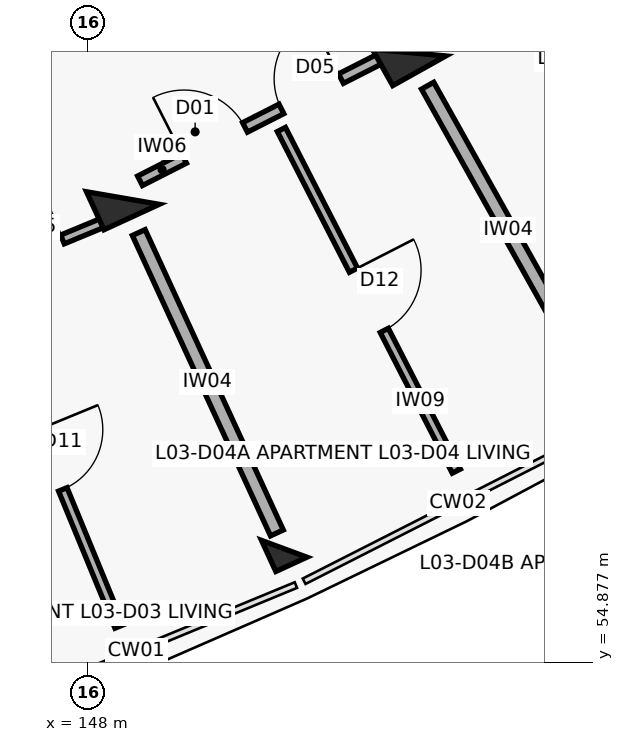
"""IFC4 building model, lengths in metres.
Left out: names, types, materials, properties, quantities, classifications, styles, units other than length and angle.
Written with IfcOpenShell. Run it as: python <this file> out.ifc"""

import sys

from ifc_helpers import new_model, si_unit, direction, frame, frame_2d, origin, origin_2d, place, context, subcontext, project, spatial, rectangle, extrude, element, fill, save


model = new_model("IFC4")
c1 = context("Model", 3, precision=1e-05, world=origin(), true_north=direction((0.0, 1.0)))
c2 = subcontext(c1, "Body", "Model", "MODEL_VIEW")
j1 = project(units=[si_unit("LENGTHUNIT", "METRE"), si_unit("PLANEANGLEUNIT", "RADIAN")], contexts=[c1])
p1 = place(None, origin())
s1 = spatial("IfcSite", under=j1, at=p1, CompositionType="ELEMENT")
p2 = place(p1, origin())
s2 = spatial("IfcBuilding", under=s1, at=p2, CompositionType="ELEMENT")
p3 = place(p2, frame((0.0, 0.0, 11.2)))
s3 = spatial("IfcBuildingStorey", under=s2, at=p3, CompositionType="ELEMENT", Elevation=11.2)
p4 = place(p3, frame((148.461, 60.982, 0.0), z_axis=(0.0, 0.0, 1.0), x_axis=(0.417867073801, -0.908508177527, 0.0)))
e1 = element("IfcColumn", 1, at=p4, inside=s3, PredefinedType="COLUMN", context=c2, shape_type="SweptSolid", body=[
    extrude(rectangle(XDim=0.55, YDim=0.8, at=origin_2d()), origin(), (0.0, 0.0, 1.0), 3.1),
])
p5 = place(p3, frame((150.584, 56.367, 0.0), z_axis=(0.0, 0.0, 1.0), x_axis=(0.417867073801, -0.908508177527, 0.0)))
e2 = element("IfcColumn", 2, at=p5, inside=s3, PredefinedType="COLUMN", context=c2, shape_type="SweptSolid", body=[
    extrude(rectangle(XDim=0.45, YDim=0.45, at=origin_2d()), origin(), (0.0, 0.0, 1.0), 3.1),
])
p6 = place(p3, frame((152.227, 62.897, 0.0), z_axis=(0.0, 0.0, 1.0), x_axis=(0.487859659139, -0.87292207727, 0.0)))
e3 = element("IfcColumn", 3, at=p6, inside=s3, PredefinedType="COLUMN", context=c2, shape_type="SweptSolid", body=[
    extrude(rectangle(XDim=0.55, YDim=0.8, at=origin_2d()), origin(), (0.0, 0.0, 1.0), 3.1),
])
p7 = place(p3, frame((144.903, 59.296, 0.0), z_axis=(0.0, 0.0, 1.0), x_axis=(0.924207914011, 0.381889685223, 0.0)))
e4 = element("IfcWall", 4, at=p7, inside=s3, PredefinedType="PARTITIONING", context=c2, shape_type="SweptSolid", body=[
    extrude(rectangle(XDim=3.64, YDim=0.125, at=frame_2d((1.82, 0.0))), origin(), (0.0, 0.0, 1.0), 2.08),
])
p8 = place(p7, frame((0.65, 0.0, 0.0)))
e5 = element("IfcOpeningElement", 5, at=p8, cuts=e4, PredefinedType="OPENING", context=c2, shape_type="SweptSolid", body=[
    extrude(rectangle(XDim=0.9, YDim=2.1, at=frame_2d((0.45, 1.05))), frame((0.0, 0.073, 0.0), z_axis=(0.0, -1.0, 0.0), x_axis=(1.0, 0.0, 0.0)), (0.0, 0.0, 1.0), 0.145),
])
p9 = place(p7, frame((2.11, 0.0, 0.0)))
e6 = element("IfcOpeningElement", 6, at=p9, cuts=e4, PredefinedType="OPENING", context=c2, shape_type="SweptSolid", body=[
    extrude(rectangle(XDim=0.88, YDim=2.1, at=frame_2d((0.44, 1.05))), frame((0.0, 0.073, 0.0), z_axis=(0.0, -1.0, 0.0), x_axis=(1.0, 0.0, 0.0)), (0.0, 0.0, 1.0), 0.145),
])
p10 = place(p3, frame((146.605, 59.738, 0.0), z_axis=(0.0, 0.0, 1.0), x_axis=(0.380553327256, -0.924758976769, 0.0)))
e7 = element("IfcWall", 7, at=p10, inside=s3, PredefinedType="PARTITIONING", context=c2, shape_type="SweptSolid", body=[
    extrude(rectangle(XDim=4.75, YDim=0.12, at=frame_2d((2.375, 0.0))), origin(), (0.0, 0.0, 1.0), 2.08),
])
p11 = place(p10, frame((1.95, 0.0, 0.0)))
e8 = element("IfcOpeningElement", 8, at=p11, cuts=e7, PredefinedType="OPENING", context=c2, shape_type="SweptSolid", body=[
    extrude(rectangle(XDim=0.85, YDim=2.1, at=frame_2d((0.425, 1.05))), frame((0.0, 0.07, 0.0), z_axis=(0.0, -1.0, 0.0), x_axis=(1.0, 0.0, 0.0)), (0.0, 0.0, 1.0), 0.14),
])
p12 = place(p3, frame((148.687, 61.209, 0.0), z_axis=(0.0, 0.0, 1.0), x_axis=(0.891396224028, 0.453224857866, 0.0)))
e9 = element("IfcWall", 9, at=p12, inside=s3, PredefinedType="PARTITIONING", context=c2, shape_type="SweptSolid", body=[
    extrude(rectangle(XDim=3.617, YDim=0.14, at=frame_2d((1.808, 0.0))), origin(), (0.0, 0.0, 1.0), 2.08),
])
p13 = place(p12, frame((0.65, 0.0, 0.0)))
e10 = element("IfcOpeningElement", 10, at=p13, cuts=e9, PredefinedType="OPENING", context=c2, shape_type="SweptSolid", body=[
    extrude(rectangle(XDim=0.9, YDim=2.1, at=frame_2d((0.45, 1.05))), frame((0.0, 0.08, 0.0), z_axis=(0.0, -1.0, 0.0), x_axis=(1.0, 0.0, 0.0)), (0.0, 0.0, 1.0), 0.16),
])
p14 = place(p12, frame((2.086, 0.0, 0.0)))
e11 = element("IfcOpeningElement", 11, at=p14, cuts=e9, PredefinedType="OPENING", context=c2, shape_type="SweptSolid", body=[
    extrude(rectangle(XDim=0.88, YDim=2.1, at=frame_2d((0.44, 1.05))), frame((0.0, 0.08, 0.0), z_axis=(0.0, -1.0, 0.0), x_axis=(1.0, 0.0, 0.0)), (0.0, 0.0, 1.0), 0.16),
])
p15 = place(p3, frame((150.547, 61.884, 0.0), z_axis=(0.0, 0.0, 1.0), x_axis=(0.455778725258, -0.89009311513, 0.0)))
e12 = element("IfcWall", 12, at=p15, inside=s3, PredefinedType="PARTITIONING", context=c2, shape_type="SweptSolid", body=[
    extrude(rectangle(XDim=5.05, YDim=0.12, at=frame_2d((2.525, 0.0))), origin(), (0.0, 0.0, 1.0), 2.08),
])
p16 = place(p15, frame((2.08, 0.0, 0.0)))
e13 = element("IfcOpeningElement", 13, at=p16, cuts=e12, PredefinedType="OPENING", context=c2, shape_type="SweptSolid", body=[
    extrude(rectangle(XDim=0.89, YDim=2.1, at=frame_2d((0.445, 1.05))), frame((0.0, 0.07, 0.0), z_axis=(0.0, -1.0, 0.0), x_axis=(1.0, 0.0, 0.0)), (0.0, 0.0, 1.0), 0.14),
])
p17 = place(p3, frame((148.67, 60.528, 0.0), z_axis=(0.0, 0.0, 1.0), x_axis=(0.417837051164, -0.908521985796, 0.0)))
e14 = element("IfcWall", 14, at=p17, inside=s3, PredefinedType="SOLIDWALL", context=c2, shape_type="SweptSolid", body=[
    extrude(rectangle(XDim=4.35, YDim=0.185, at=frame_2d((2.175, 0.0))), origin(), (0.0, 0.0, 1.0), 2.08),
])
p18 = place(p3, frame((152.448, 66.442, 0.0), z_axis=(0.0, 0.0, 1.0), x_axis=(0.520511872578, -0.853854431683, 0.0)))
e15 = element("IfcWall", 15, at=p18, inside=s3, PredefinedType="PARTITIONING", context=c2, shape_type="SweptSolid", body=[
    extrude(rectangle(XDim=7.95, YDim=0.14, at=frame_2d((3.975, 0.0))), origin(), (0.0, 0.0, 1.0), 2.08),
])
p19 = place(p18, frame((6.05, 0.0, 0.0)))
e16 = element("IfcOpeningElement", 16, at=p19, cuts=e15, PredefinedType="OPENING", context=c2, shape_type="SweptSolid", body=[
    extrude(rectangle(XDim=0.92, YDim=2.1, at=frame_2d((0.46, 1.05))), frame((0.0, 0.08, 0.0), z_axis=(0.0, -1.0, 0.0), x_axis=(1.0, 0.0, 0.0)), (0.0, 0.0, 1.0), 0.16),
])
p20 = place(p3, frame((152.471, 62.46, 0.0), z_axis=(0.0, 0.0, 1.0), x_axis=(0.487866639184, -0.872918176218, 0.0)))
e17 = element("IfcWall", 17, at=p20, inside=s3, PredefinedType="SOLIDWALL", context=c2, shape_type="SweptSolid", body=[
    extrude(rectangle(XDim=4.35, YDim=0.185, at=frame_2d((2.175, 0.0))), origin(), (0.0, 0.0, 1.0), 2.08),
])
p21 = place(p9, origin())
e18 = element("IfcDoor", 18, at=p21, inside=s3, OperationType="SINGLE_SWING_RIGHT", PredefinedType="DOOR", context=c2, shape_type="SweptSolid", body=[
    extrude(rectangle(XDim=0.88, YDim=2.1, at=frame_2d((0.44, 1.05))), frame((0.0, 0.025, 0.0), z_axis=(0.0, -1.0, 0.0), x_axis=(1.0, 0.0, 0.0)), (0.0, 0.0, 1.0), 0.05),
])
fill(e6, e18)
p22 = place(p11, origin())
e19 = element("IfcDoor", 19, at=p22, inside=s3, OperationType="SINGLE_SWING_LEFT", PredefinedType="DOOR", context=c2, shape_type="SweptSolid", body=[
    extrude(rectangle(XDim=0.85, YDim=2.1, at=frame_2d((0.425, 1.05))), frame((0.0, 0.025, 0.0), z_axis=(0.0, -1.0, 0.0), x_axis=(1.0, 0.0, 0.0)), (0.0, 0.0, 1.0), 0.05),
])
fill(e8, e19)
p23 = place(p13, origin())
e20 = element("IfcDoor", 20, at=p23, inside=s3, OperationType="SINGLE_SWING_LEFT", PredefinedType="DOOR", context=c2, shape_type="SweptSolid", body=[
    extrude(rectangle(XDim=0.9, YDim=2.1, at=frame_2d((0.45, 1.05))), frame((0.0, 0.025, 0.0), z_axis=(0.0, -1.0, 0.0), x_axis=(1.0, 0.0, 0.0)), (0.0, 0.0, 1.0), 0.05),
])
fill(e10, e20)
p24 = place(p14, origin())
e21 = element("IfcDoor", 21, at=p24, inside=s3, OperationType="SINGLE_SWING_RIGHT", PredefinedType="DOOR", context=c2, shape_type="SweptSolid", body=[
    extrude(rectangle(XDim=0.88, YDim=2.1, at=frame_2d((0.44, 1.05))), frame((0.0, 0.025, 0.0), z_axis=(0.0, -1.0, 0.0), x_axis=(1.0, 0.0, 0.0)), (0.0, 0.0, 1.0), 0.05),
])
fill(e11, e21)
p25 = place(p16, origin())
e22 = element("IfcDoor", 22, at=p25, inside=s3, OperationType="SINGLE_SWING_LEFT", PredefinedType="DOOR", context=c2, shape_type="SweptSolid", body=[
    extrude(rectangle(XDim=0.89, YDim=2.1, at=frame_2d((0.445, 1.05))), frame((0.0, 0.025, 0.0), z_axis=(0.0, -1.0, 0.0), x_axis=(1.0, 0.0, 0.0)), (0.0, 0.0, 1.0), 0.05),
])
fill(e13, e22)
save(model, sys.argv[1])
